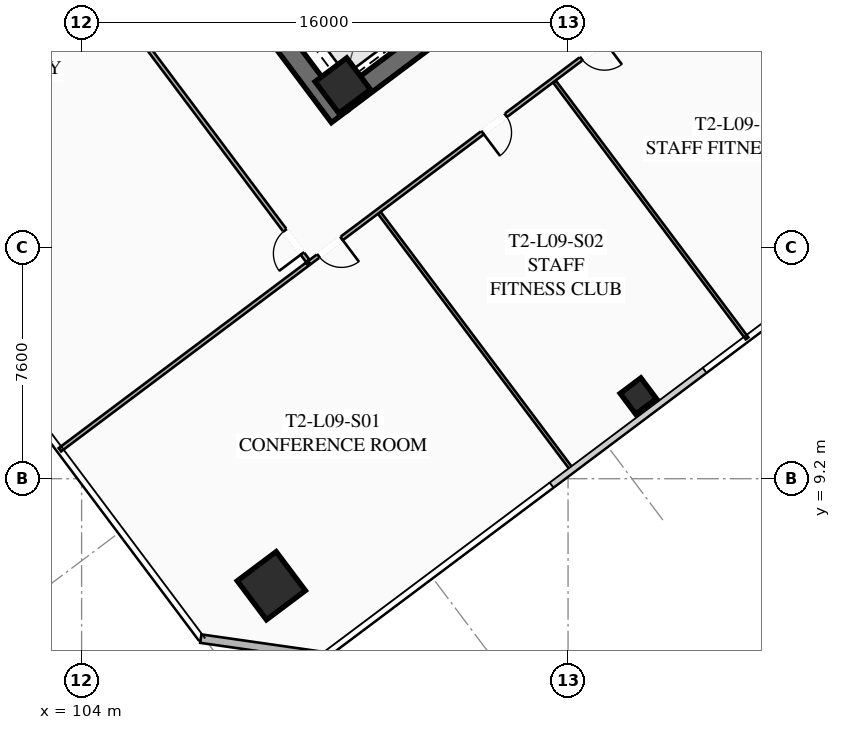
"""IFC4 building model, lengths in metres.
Left out: names, types, materials, properties, quantities, classifications, styles, units other than length and angle.
Written with IfcOpenShell. Run it as: python <this file> out.ifc"""

import sys

from ifc_helpers import new_model, si_unit, direction, frame, frame_2d, origin, origin_2d, place, context, subcontext, project, spatial, rectangle, hollow_rectangle, extrude, element, fill, save


model = new_model("IFC4")
c1 = context("Model", 3, precision=1e-05, world=origin(), true_north=direction((0.0, 1.0)))
c2 = subcontext(c1, "Body", "Model", "MODEL_VIEW")
j1 = project(units=[si_unit("LENGTHUNIT", "METRE"), si_unit("PLANEANGLEUNIT", "RADIAN")], contexts=[c1])
p1 = place(None, origin())
s1 = spatial("IfcSite", under=j1, at=p1, CompositionType="ELEMENT")
p2 = place(p1, origin())
s2 = spatial("IfcBuilding", under=s1, at=p2, CompositionType="ELEMENT")
p3 = place(p2, frame((0.0, 0.0, 38.8)))
s3 = spatial("IfcBuildingStorey", under=s2, at=p3, CompositionType="ELEMENT", Elevation=38.8)
p4 = place(p3, frame((112.476, 21.107, 0.0), z_axis=(0.0, 0.0, 1.0), x_axis=(-0.600005007985, 0.799996243986, 0.0)))
e1 = element("IfcWall", 1, at=p4, inside=s3, PredefinedType="SHEAR", context=c2, shape_type="SweptSolid", body=[
    extrude(rectangle(XDim=15.6, YDim=0.65, at=frame_2d((7.8, 0.0))), origin(), (0.0, 0.0, 1.0), 3.55),
])
p5 = place(p3, frame((124.429, 30.478, 0.0), z_axis=(0.0, 0.0, 1.0), x_axis=(-0.799998028465, -0.600002628705, 0.0)))
e2 = element("IfcWall", 2, at=p5, inside=s3, PredefinedType="SHEAR", context=c2, shape_type="SweptSolid", body=[
    extrude(rectangle(XDim=14.86, YDim=0.65, at=frame_2d((7.43, 0.0))), origin(), (0.0, 0.0, 1.0), 3.55),
])
p6 = place(p5, frame((9.13, 0.0, 0.0)))
e3 = element("IfcOpeningElement", 3, at=p6, cuts=e2, PredefinedType="OPENING", context=c2, shape_type="SweptSolid", body=[
    extrude(rectangle(XDim=1.25, YDim=2.25, at=frame_2d((0.625, 1.125))), frame((0.0, 0.335, 0.0), z_axis=(0.0, -1.0, 0.0), x_axis=(1.0, 0.0, 0.0)), (0.0, 0.0, 1.0), 0.67),
])
p7 = place(p5, frame((4.08, 0.0, 0.0)))
e4 = element("IfcOpeningElement", 4, at=p7, cuts=e2, PredefinedType="OPENING", context=c2, shape_type="SweptSolid", body=[
    extrude(rectangle(XDim=1.25, YDim=2.25, at=frame_2d((0.625, 1.125))), frame((0.0, 0.335, 0.0), z_axis=(0.0, -1.0, 0.0), x_axis=(1.0, 0.0, 0.0)), (0.0, 0.0, 1.0), 0.67),
])
p8 = place(p3, frame((112.59, 22.13, 0.0), z_axis=(0.0, 0.0, 1.0), x_axis=(0.799999996291, 0.600000004945, 0.0)))
e5 = element("IfcColumn", 5, at=p8, inside=s3, PredefinedType="COLUMN", context=c2, shape_type="SweptSolid", body=[
    extrude(hollow_rectangle(XDim=1.3, YDim=1.3, WallThickness=0.05, at=origin_2d()), origin(), (0.0, 0.0, 1.0), 3.35),
])
p9 = place(p3, frame((110.24, 5.68, 0.0), z_axis=(0.0, 0.0, 1.0), x_axis=(0.799999996291, 0.600000004945, 0.0)))
e6 = element("IfcColumn", 6, at=p9, inside=s3, PredefinedType="COLUMN", context=c2, shape_type="SweptSolid", body=[
    extrude(hollow_rectangle(XDim=1.6, YDim=1.6, WallThickness=0.06, at=origin_2d()), origin(), (0.0, 0.0, 1.0), 3.35),
])
p10 = place(p3, frame((122.31, 11.92, 0.0), z_axis=(0.0, 0.0, 1.0), x_axis=(0.799999996291, 0.600000004945, 0.0)))
e7 = element("IfcColumn", 7, at=p10, inside=s3, PredefinedType="COLUMN", context=c2, shape_type="SweptSolid", body=[
    extrude(hollow_rectangle(XDim=0.85, YDim=0.85, WallThickness=0.035, at=origin_2d()), origin(), (0.0, 0.0, 1.0), 3.35),
])
p11 = place(p3, frame((111.98, 3.36, 0.0), z_axis=(0.0, 0.0, 1.0), x_axis=(-0.989955445613, 0.14137968631, 0.0)))
e8 = element("IfcWall", 8, at=p11, inside=s3, PredefinedType="SOLIDWALL", context=c2, shape_type="SweptSolid", body=[
    extrude(rectangle(XDim=4.101, YDim=0.28, at=frame_2d((2.051, 0.0))), origin(), (0.0, 0.0, 1.0), 3.35),
])
p12 = place(p3, frame((135.55, 34.35, 0.0), z_axis=(0.0, 0.0, 1.0), x_axis=(-0.799998052067, -0.600002597235, 0.0)))
e9 = element("IfcWall", 9, at=p12, inside=s3, PredefinedType="PARTITIONING", context=c2, shape_type="SweptSolid", body=[
    extrude(rectangle(XDim=30.08, YDim=0.135, at=frame_2d((15.04, 0.0))), origin(), (0.0, 0.0, 1.0), 2.703),
])
p13 = place(p12, frame((28.75, 0.0, 0.0)))
e10 = element("IfcOpeningElement", 10, at=p13, cuts=e9, PredefinedType="OPENING", context=c2, shape_type="SweptSolid", body=[
    extrude(rectangle(XDim=0.95, YDim=2.05, at=frame_2d((0.475, 1.025))), frame((0.0, 0.077, 0.0), z_axis=(0.0, -1.0, 0.0), x_axis=(1.0, 0.0, 0.0)), (0.0, 0.0, 1.0), 0.155),
])
p14 = place(p12, frame((21.999, 0.0, 0.0)))
e11 = element("IfcOpeningElement", 11, at=p14, cuts=e9, PredefinedType="OPENING", context=c2, shape_type="SweptSolid", body=[
    extrude(rectangle(XDim=0.95, YDim=2.05, at=frame_2d((0.475, 1.025))), frame((0.0, 0.077, 0.0), z_axis=(0.0, -1.0, 0.0), x_axis=(1.0, 0.0, 0.0)), (0.0, 0.0, 1.0), 0.155),
])
p15 = place(p12, frame((17.939, 0.0, 0.0)))
e12 = element("IfcOpeningElement", 12, at=p15, cuts=e9, PredefinedType="OPENING", context=c2, shape_type="SweptSolid", body=[
    extrude(rectangle(XDim=0.95, YDim=2.05, at=frame_2d((0.475, 1.025))), frame((0.0, 0.077, 0.0), z_axis=(0.0, -1.0, 0.0), x_axis=(1.0, 0.0, 0.0)), (0.0, 0.0, 1.0), 0.155),
])
p16 = place(p12, frame((0.38, 0.0, 0.0)))
e13 = element("IfcOpeningElement", 13, at=p16, cuts=e9, PredefinedType="OPENING", context=c2, shape_type="SweptSolid", body=[
    extrude(rectangle(XDim=0.95, YDim=2.05, at=frame_2d((0.475, 1.025))), frame((0.0, 0.077, 0.0), z_axis=(0.0, -1.0, 0.0), x_axis=(1.0, 0.0, 0.0)), (0.0, 0.0, 1.0), 0.155),
])
p17 = place(p3, frame((120.128, 9.496, 0.0), z_axis=(0.0, 0.0, 1.0), x_axis=(-0.599992594658, 0.800005553953, 0.0)))
e14 = element("IfcWall", 14, at=p17, inside=s3, PredefinedType="PARTITIONING", context=c2, shape_type="SweptSolid", body=[
    extrude(rectangle(XDim=10.55, YDim=0.11, at=frame_2d((5.275, 0.0))), origin(), (0.0, 0.0, 1.0), 2.703),
])
for number, where, z_axis, x_axis in (
    (15, (125.888, 13.816, 0.0), (0.0, 0.0, 1.0), (-0.6, 0.8, 0.0)),
    (16, (132.048, 18.436, 0.0), (0.0, 0.0, 1.0), (-0.6, 0.8, 0.0)),
):
    element("IfcWall", number, at=place(p3, frame(where, z_axis=z_axis, x_axis=x_axis)), inside=s3, PredefinedType="PARTITIONING", context=c2, shape_type="SweptSolid", body=[
        extrude(rectangle(XDim=10.55, YDim=0.11, at=frame_2d((5.275, 0.0))), origin(), (0.0, 0.0, 1.0), 2.703),
    ])
p18 = place(p3, frame((111.438, 16.366, 0.0), z_axis=(0.0, 0.0, 1.0), x_axis=(-0.599996414648, 0.800002689001, 0.0)))
e17 = element("IfcWall", 17, at=p18, inside=s3, PredefinedType="PARTITIONING", context=c2, shape_type="SweptSolid", body=[
    extrude(rectangle(XDim=21.79, YDim=0.135, at=frame_2d((10.895, 0.0))), origin(), (0.0, 0.0, 1.0), 2.703),
])
p19 = place(p18, frame((0.3, 0.0, 0.0)))
e18 = element("IfcOpeningElement", 18, at=p19, cuts=e17, PredefinedType="OPENING", context=c2, shape_type="SweptSolid", body=[
    extrude(rectangle(XDim=0.95, YDim=2.05, at=frame_2d((0.475, 1.025))), frame((0.0, 0.077, 0.0), z_axis=(0.0, -1.0, 0.0), x_axis=(1.0, 0.0, 0.0)), (0.0, 0.0, 1.0), 0.155),
])
p20 = place(p3, frame((103.286, 10.152, 0.0), z_axis=(0.0, 0.0, 1.0), x_axis=(0.800017283844, 0.599976954183, 0.0)))
e19 = element("IfcWall", 19, at=p20, inside=s3, PredefinedType="PARTITIONING", context=c2, shape_type="SweptSolid", body=[
    extrude(rectangle(XDim=10.17, YDim=0.135, at=frame_2d((5.085, 0.0))), origin(), (0.0, 0.0, 1.0), 2.703),
])
p21 = place(p13, origin())
e20 = element("IfcDoor", 20, at=p21, inside=s3, OperationType="SINGLE_SWING_LEFT", PredefinedType="DOOR", context=c2, shape_type="SweptSolid", body=[
    extrude(rectangle(XDim=0.95, YDim=2.05, at=frame_2d((0.475, 1.025))), frame((0.0, 0.025, 0.0), z_axis=(0.0, -1.0, 0.0), x_axis=(1.0, 0.0, 0.0)), (0.0, 0.0, 1.0), 0.05),
])
fill(e10, e20)
p22 = place(p14, origin())
e21 = element("IfcDoor", 21, at=p22, inside=s3, OperationType="SINGLE_SWING_RIGHT", PredefinedType="DOOR", context=c2, shape_type="SweptSolid", body=[
    extrude(rectangle(XDim=0.95, YDim=2.05, at=frame_2d((0.475, 1.025))), frame((0.0, 0.025, 0.0), z_axis=(0.0, -1.0, 0.0), x_axis=(1.0, 0.0, 0.0)), (0.0, 0.0, 1.0), 0.05),
])
fill(e11, e21)
p23 = place(p15, origin())
e22 = element("IfcDoor", 22, at=p23, inside=s3, OperationType="SINGLE_SWING_LEFT", PredefinedType="DOOR", context=c2, shape_type="SweptSolid", body=[
    extrude(rectangle(XDim=0.95, YDim=2.05, at=frame_2d((0.475, 1.025))), frame((0.0, 0.025, 0.0), z_axis=(0.0, -1.0, 0.0), x_axis=(1.0, 0.0, 0.0)), (0.0, 0.0, 1.0), 0.05),
])
fill(e12, e22)
p24 = place(p19, origin())
e23 = element("IfcDoor", 23, at=p24, inside=s3, OperationType="SINGLE_SWING_LEFT", PredefinedType="DOOR", context=c2, shape_type="SweptSolid", body=[
    extrude(rectangle(XDim=0.95, YDim=2.05, at=frame_2d((0.475, 1.025))), frame((0.0, 0.025, 0.0), z_axis=(0.0, -1.0, 0.0), x_axis=(1.0, 0.0, 0.0)), (0.0, 0.0, 1.0), 0.05),
])
fill(e18, e23)
save(model, sys.argv[1])
